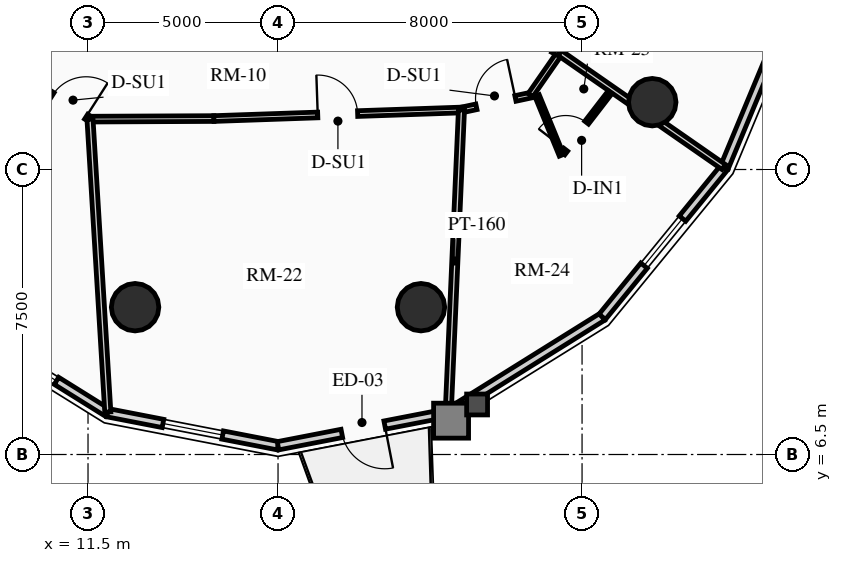
"""IFC4 building model, lengths in metres.
Left out: names, types, materials, properties, quantities, classifications, styles, units other than length and angle.
Written with IfcOpenShell. Run it as: python <this file> out.ifc"""

import sys

from ifc_helpers import new_model, si_unit, direction, frame, frame_2d, origin, origin_2d, place, context, subcontext, project, spatial, rectangle, circle, extrude, source, transform, mapped, element, fill, save


model = new_model("IFC4")
c1 = context("Model", 3, precision=1e-05, world=origin(), true_north=direction((0.0, 1.0)))
c2 = subcontext(c1, "Body", "Model", "MODEL_VIEW")
j1 = project(units=[si_unit("LENGTHUNIT", "METRE"), si_unit("PLANEANGLEUNIT", "RADIAN")], contexts=[c1])
p1 = place(None, origin())
s1 = spatial("IfcSite", under=j1, at=p1, CompositionType="ELEMENT")
p2 = place(p1, origin())
s2 = spatial("IfcBuilding", under=s1, at=p2, CompositionType="ELEMENT")
p3 = place(p2, frame((0.0, 0.0, 151.6)))
s3 = spatial("IfcBuildingStorey", under=s2, at=p3, CompositionType="ELEMENT", Elevation=151.6)
for number, where, z_axis, x_axis in (
    (1, (12.739, 10.377, 0.0), (0.0, 0.0, 1.0), (1.0, 0.0, 0.0)),
    (2, (20.261, 10.377, 0.0), (0.0, 0.0, 1.0), (1.0, 0.0, 0.0)),
    (3, (26.347, 15.771, 0.0), (0.0, 0.0, 1.0), (1.0, 0.0, 0.0)),
):
    element("IfcColumn", number, at=place(p3, frame(where, z_axis=z_axis, x_axis=x_axis)), inside=s3, PredefinedType="USERDEFINED", context=c2, shape_type="SweptSolid", body=[
        extrude(circle(Radius=0.625, at=origin_2d()), origin(), (0.0, 0.0, 1.0), 2.91),
    ])
p4 = place(p3, frame((12.015, 7.6, 0.0), z_axis=(0.0, 0.0, 1.0), x_axis=(-0.848452391194, 0.529271707044, 0.0)))
e4 = element("IfcWall", 4, at=p4, inside=s3, PredefinedType="SOLIDWALL", context=c2, shape_type="SweptSolid", body=[
    extrude(rectangle(XDim=4.769, YDim=0.22, at=frame_2d((2.385, 0.0))), origin(), (0.0, 0.0, 1.0), 2.245),
])
m1 = source(origin(), c2, "Body", "SweptSolid", [
    extrude(rectangle(XDim=1.6, YDim=1.3, at=frame_2d((0.8, 0.65))), frame((0.0, 0.12, 0.0), z_axis=(0.0, -1.0, 0.0), x_axis=(1.0, 0.0, 0.0)), (0.0, 0.0, 1.0), 0.24),
])
p5 = place(p4, frame((1.585, 0.0, 0.65)))
e5 = element("IfcOpeningElement", 5, at=p5, cuts=e4, PredefinedType="OPENING", context=c2, shape_type="MappedRepresentation", body=[
    mapped(m1, transform((0.0, 0.0, 0.0), x_axis=(1.0, 0.0, 0.0), y_axis=(0.0, 1.0, 0.0), z_axis=(0.0, 0.0, 1.0), scale=1.0)),
])
p6 = place(p3, frame((16.5, 6.73, 0.0), z_axis=(0.0, 0.0, 1.0), x_axis=(-0.981718699963, 0.190337579429, 0.0)))
e6 = element("IfcWall", 6, at=p6, inside=s3, PredefinedType="SOLIDWALL", context=c2, shape_type="SweptSolid", body=[
    extrude(rectangle(XDim=4.569, YDim=0.22, at=frame_2d((2.284, 0.0))), origin(), (0.0, 0.0, 1.0), 2.245),
])
p7 = place(p6, frame((1.484, 0.0, 0.65)))
e7 = element("IfcOpeningElement", 7, at=p7, cuts=e6, PredefinedType="OPENING", context=c2, shape_type="MappedRepresentation", body=[
    mapped(m1, transform((0.0, 0.0, 0.0), x_axis=(1.0, 0.0, 0.0), y_axis=(0.0, 1.0, 0.0), z_axis=(0.0, 0.0, 1.0), scale=1.0)),
])
p8 = place(p3, frame((20.985, 7.6, 0.0), z_axis=(0.0, 0.0, 1.0), x_axis=(-0.981718699963, -0.190337579429, 0.0)))
e8 = element("IfcWall", 8, at=p8, inside=s3, PredefinedType="SOLIDWALL", context=c2, shape_type="SweptSolid", body=[
    extrude(rectangle(XDim=4.569, YDim=0.22, at=frame_2d((2.284, 0.0))), origin(), (0.0, 0.0, 1.0), 2.245),
])
m2 = source(origin(), c2, "Body", "SweptSolid", [
    extrude(rectangle(XDim=1.15, YDim=2.005, at=frame_2d((0.575, 1.002))), frame((0.0, 0.12, 0.0), z_axis=(0.0, -1.0, 0.0), x_axis=(1.0, 0.0, 0.0)), (0.0, 0.0, 1.0), 0.24),
])
p9 = place(p8, frame((1.709, 0.0, 0.0)))
e9 = element("IfcOpeningElement", 9, at=p9, cuts=e8, PredefinedType="OPENING", context=c2, shape_type="MappedRepresentation", body=[
    mapped(m2, transform((0.0, 0.0, 0.0), x_axis=(1.0, 0.0, 0.0), y_axis=(0.0, 1.0, 0.0), z_axis=(0.0, 0.0, 1.0), scale=1.0)),
])
p10 = place(p3, frame((25.032, 10.124, 0.0), z_axis=(0.0, 0.0, 1.0), x_axis=(-0.848452391194, -0.529271707044, 0.0)))
e10 = element("IfcWall", 10, at=p10, inside=s3, PredefinedType="SOLIDWALL", context=c2, shape_type="SweptSolid", body=[
    extrude(rectangle(XDim=4.769, YDim=0.22, at=frame_2d((2.385, 0.0))), origin(), (0.0, 0.0, 1.0), 2.245),
])
p11 = place(p3, frame((28.243, 14.055, 0.0), z_axis=(0.0, 0.0, 1.0), x_axis=(-0.632598524901, -0.774479894053, 0.0)))
e11 = element("IfcWall", 11, at=p11, inside=s3, PredefinedType="SOLIDWALL", context=c2, shape_type="SweptSolid", body=[
    extrude(rectangle(XDim=5.076, YDim=0.22, at=frame_2d((2.538, 0.0))), origin(), (0.0, 0.0, 1.0), 2.245),
])
p12 = place(p11, frame((1.738, 0.0, 0.65)))
e12 = element("IfcOpeningElement", 12, at=p12, cuts=e11, PredefinedType="OPENING", context=c2, shape_type="MappedRepresentation", body=[
    mapped(m1, transform((0.0, 0.0, 0.0), x_axis=(1.0, 0.0, 0.0), y_axis=(0.0, 1.0, 0.0), z_axis=(0.0, 0.0, 1.0), scale=1.0)),
])
p13 = place(p3, frame((30.305, 19.009, 0.0), z_axis=(0.0, 0.0, 1.0), x_axis=(-0.384259959969, -0.923224936386, 0.0)))
e13 = element("IfcWall", 13, at=p13, inside=s3, PredefinedType="SOLIDWALL", context=c2, shape_type="SweptSolid", body=[
    extrude(rectangle(XDim=5.365, YDim=0.22, at=frame_2d((2.683, 0.0))), origin(), (0.0, 0.0, 1.0), 2.245),
])
p14 = place(p3, frame((10.237, 16.168, 0.0), z_axis=(0.0, 0.0, 1.0), x_axis=(0.842061223587, -0.53938195718, 0.0)))
e14 = element("IfcWall", 14, at=p14, inside=s3, PredefinedType="PARTITIONING", context=c2, shape_type="SweptSolid", body=[
    extrude(rectangle(XDim=1.562, YDim=0.15, at=frame_2d((0.781, 0.0))), origin(), (0.0, 0.0, 1.0), 2.245),
])
m3 = source(origin(), c2, "Body", "SweptSolid", [
    extrude(rectangle(XDim=1.05, YDim=2.015, at=frame_2d((0.525, 1.007))), frame((0.0, 0.085, 0.0), z_axis=(0.0, -1.0, 0.0), x_axis=(1.0, 0.0, 0.0)), (0.0, 0.0, 1.0), 0.17),
])
p15 = place(p14, frame((0.392, 0.0, 0.0)))
e15 = element("IfcOpeningElement", 15, at=p15, cuts=e14, PredefinedType="OPENING", context=c2, shape_type="MappedRepresentation", body=[
    mapped(m3, transform((0.0, 0.0, 0.0), x_axis=(1.0, 0.0, 0.0), y_axis=(0.0, 1.0, 0.0), z_axis=(0.0, 0.0, 1.0), scale=1.0)),
])
p16 = place(p3, frame((11.552, 15.326, 0.0), z_axis=(0.0, 0.0, 1.0), x_axis=(0.999989573465, 0.004566504266, 0.0)))
e16 = element("IfcWall", 16, at=p16, inside=s3, PredefinedType="PARTITIONING", context=c2, shape_type="SweptSolid", body=[
    extrude(rectangle(XDim=3.261, YDim=0.15, at=frame_2d((1.631, 0.0))), origin(), (0.0, 0.0, 1.0), 2.245),
])
p17 = place(p3, frame((14.813, 15.341, 0.0), z_axis=(0.0, 0.0, 1.0), x_axis=(0.999402077819, 0.034575813105, 0.0)))
e17 = element("IfcWall", 17, at=p17, inside=s3, PredefinedType="PARTITIONING", context=c2, shape_type="SweptSolid", body=[
    extrude(rectangle(XDim=6.517, YDim=0.15, at=frame_2d((3.259, 0.0))), origin(), (0.0, 0.0, 1.0), 2.245),
])
p18 = place(p17, frame((2.734, 0.0, 0.0)))
e18 = element("IfcOpeningElement", 18, at=p18, cuts=e17, PredefinedType="OPENING", context=c2, shape_type="MappedRepresentation", body=[
    mapped(m3, transform((0.0, 0.0, 0.0), x_axis=(1.0, 0.0, 0.0), y_axis=(0.0, 1.0, 0.0), z_axis=(0.0, 0.0, 1.0), scale=1.0)),
])
p19 = place(p3, frame((21.326, 15.566, 0.0), z_axis=(0.0, 0.0, 1.0), x_axis=(0.977908238308, 0.209034632176, 0.0)))
e19 = element("IfcWall", 19, at=p19, inside=s3, PredefinedType="PARTITIONING", context=c2, shape_type="SweptSolid", body=[
    extrude(rectangle(XDim=1.855, YDim=0.15, at=frame_2d((0.927, 0.0))), origin(), (0.0, 0.0, 1.0), 2.245),
])
p20 = place(p19, frame((0.402, 0.0, 0.0)))
e20 = element("IfcOpeningElement", 20, at=p20, cuts=e19, PredefinedType="OPENING", context=c2, shape_type="MappedRepresentation", body=[
    mapped(m3, transform((0.0, 0.0, 0.0), x_axis=(1.0, 0.0, 0.0), y_axis=(0.0, 1.0, 0.0), z_axis=(0.0, 0.0, 1.0), scale=1.0)),
])
p21 = place(p3, frame((23.14, 15.954, 0.0), z_axis=(0.0, 0.0, 1.0), x_axis=(0.570699895117, 0.821158711647, 0.0)))
e21 = element("IfcWall", 21, at=p21, inside=s3, PredefinedType="PARTITIONING", context=c2, shape_type="SweptSolid", body=[
    extrude(rectangle(XDim=1.354, YDim=0.15, at=frame_2d((0.677, 0.0))), origin(), (0.0, 0.0, 1.0), 2.245),
])
p22 = place(p3, frame((11.552, 15.326, 0.0), z_axis=(0.0, 0.0, 1.0), x_axis=(0.060740403573, -0.998153597085, 0.0)))
e22 = element("IfcWall", 22, at=p22, inside=s3, PredefinedType="PARTITIONING", context=c2, shape_type="SweptSolid", body=[
    extrude(rectangle(XDim=7.721, YDim=0.16, at=frame_2d((3.861, 0.0))), origin(), (0.0, 0.0, 1.0), 2.245),
])
p23 = place(p3, frame((21.326, 15.566, 0.0), z_axis=(0.0, 0.0, 1.0), x_axis=(-0.043642330618, -0.999047219594, 0.0)))
e23 = element("IfcWall", 23, at=p23, inside=s3, PredefinedType="PARTITIONING", context=c2, shape_type="SweptSolid", body=[
    extrude(rectangle(XDim=7.955, YDim=0.16, at=frame_2d((3.978, 0.0))), origin(), (0.0, 0.0, 1.0), 2.245),
])
p24 = place(p3, frame((23.913, 17.065, 0.0), z_axis=(0.0, 0.0, 1.0), x_axis=(0.821126775727, -0.570745843773, 0.0)))
e24 = element("IfcWall", 24, at=p24, inside=s3, PredefinedType="PARTITIONING", context=c2, shape_type="SweptSolid", body=[
    extrude(rectangle(XDim=5.254, YDim=0.16, at=frame_2d((2.627, 0.0))), origin(), (0.0, 0.0, 1.0), 2.245),
])
p25 = place(p3, frame((22.05, 18.0, 0.0), z_axis=(0.0, 0.0, 1.0), x_axis=(0.893817206679, -0.448431489799, 0.0)))
e25 = element("IfcWall", 25, at=p25, inside=s3, PredefinedType="PARTITIONING", context=c2, shape_type="SweptSolid", body=[
    extrude(rectangle(XDim=2.084, YDim=0.16, at=frame_2d((1.042, 0.0))), origin(), (0.0, 0.0, 1.0), 2.245),
])
m4 = source(origin(), c2, "Body", "SweptSolid", [
    extrude(rectangle(XDim=1.05, YDim=2.015, at=frame_2d((0.525, 1.007))), frame((0.0, 0.09, 0.0), z_axis=(0.0, -1.0, 0.0), x_axis=(1.0, 0.0, 0.0)), (0.0, 0.0, 1.0), 0.18),
])
p26 = place(p25, frame((0.834, 0.0, 0.0)))
e26 = element("IfcOpeningElement", 26, at=p26, cuts=e25, PredefinedType="OPENING", context=c2, shape_type="MappedRepresentation", body=[
    mapped(m4, transform((0.0, 0.0, 0.0), x_axis=(1.0, 0.0, 0.0), y_axis=(0.0, 1.0, 0.0), z_axis=(0.0, 0.0, 1.0), scale=1.0)),
])
p27 = place(p3, frame((23.315, 15.947, 0.0), z_axis=(0.0, 0.0, 1.0), x_axis=(0.37920929394, -0.925310926873, 0.0)))
e27 = element("IfcWall", 27, at=p27, inside=s3, PredefinedType="PARTITIONING", context=c2, shape_type="SweptSolid", body=[
    extrude(rectangle(XDim=1.698, YDim=0.125, at=frame_2d((0.849, 0.0))), origin(), (0.0, 0.0, 1.0), 2.675),
])
p28 = place(p3, frame((23.998, 14.425, 0.0), z_axis=(0.0, 0.0, 1.0), x_axis=(0.610534539262, 0.791989631478, 0.0)))
e28 = element("IfcWall", 28, at=p28, inside=s3, PredefinedType="PARTITIONING", context=c2, shape_type="SweptSolid", body=[
    extrude(rectangle(XDim=2.033, YDim=0.125, at=frame_2d((1.017, 0.0))), origin(), (0.0, 0.0, 1.0), 2.675),
])
m5 = source(origin(), c2, "Body", "SweptSolid", [
    extrude(rectangle(XDim=0.9, YDim=2.005, at=frame_2d((0.45, 1.002))), frame((0.0, 0.073, 0.0), z_axis=(0.0, -1.0, 0.0), x_axis=(1.0, 0.0, 0.0)), (0.0, 0.0, 1.0), 0.145),
])
p29 = place(p28, frame((0.12, 0.0, 0.0)))
e29 = element("IfcOpeningElement", 29, at=p29, cuts=e28, PredefinedType="OPENING", context=c2, shape_type="MappedRepresentation", body=[
    mapped(m5, transform((0.0, 0.0, 0.0), x_axis=(1.0, 0.0, 0.0), y_axis=(0.0, 1.0, 0.0), z_axis=(0.0, 0.0, 1.0), scale=1.0)),
])
m6 = source(origin(), c2, "Body", "SweptSolid", [
    extrude(rectangle(XDim=1.6, YDim=1.3, at=frame_2d((0.8, 0.65))), frame((0.0, 0.03, 0.0), z_axis=(0.0, -1.0, 0.0), x_axis=(1.0, 0.0, 0.0)), (0.0, 0.0, 1.0), 0.06),
])
p30 = place(p5, origin())
e30 = element("IfcWindow", 30, at=p30, inside=s3, PartitioningType="SINGLE_PANEL", PredefinedType="WINDOW", context=c2, shape_type="MappedRepresentation", body=[
    mapped(m6, transform((0.0, 0.0, 0.0), x_axis=(1.0, 0.0, 0.0), y_axis=(0.0, 1.0, 0.0), z_axis=(0.0, 0.0, 1.0), scale=1.0)),
])
fill(e5, e30)
p31 = place(p7, origin())
e31 = element("IfcWindow", 31, at=p31, inside=s3, PartitioningType="SINGLE_PANEL", PredefinedType="WINDOW", context=c2, shape_type="MappedRepresentation", body=[
    mapped(m6, transform((0.0, 0.0, 0.0), x_axis=(1.0, 0.0, 0.0), y_axis=(0.0, 1.0, 0.0), z_axis=(0.0, 0.0, 1.0), scale=1.0)),
])
fill(e7, e31)
m7 = source(origin(), c2, "Body", "SweptSolid", [
    extrude(rectangle(XDim=1.15, YDim=2.005, at=frame_2d((0.575, 1.002))), frame((0.0, 0.025, 0.0), z_axis=(0.0, -1.0, 0.0), x_axis=(1.0, 0.0, 0.0)), (0.0, 0.0, 1.0), 0.05),
])
p32 = place(p9, origin())
e32 = element("IfcDoor", 32, at=p32, inside=s3, OperationType="SINGLE_SWING_LEFT", PredefinedType="DOOR", context=c2, shape_type="MappedRepresentation", body=[
    mapped(m7, transform((0.0, 0.0, 0.0), x_axis=(1.0, 0.0, 0.0), y_axis=(0.0, 1.0, 0.0), z_axis=(0.0, 0.0, 1.0), scale=1.0)),
])
fill(e9, e32)
p33 = place(p12, origin())
e33 = element("IfcWindow", 33, at=p33, inside=s3, PartitioningType="SINGLE_PANEL", PredefinedType="WINDOW", context=c2, shape_type="MappedRepresentation", body=[
    mapped(m6, transform((0.0, 0.0, 0.0), x_axis=(1.0, 0.0, 0.0), y_axis=(0.0, 1.0, 0.0), z_axis=(0.0, 0.0, 1.0), scale=1.0)),
])
fill(e12, e33)
m8 = source(origin(), c2, "Body", "SweptSolid", [
    extrude(rectangle(XDim=1.05, YDim=2.015, at=frame_2d((0.525, 1.007))), frame((0.0, 0.025, 0.0), z_axis=(0.0, -1.0, 0.0), x_axis=(1.0, 0.0, 0.0)), (0.0, 0.0, 1.0), 0.05),
])
p34 = place(p15, origin())
e34 = element("IfcDoor", 34, at=p34, inside=s3, OperationType="SINGLE_SWING_RIGHT", PredefinedType="DOOR", context=c2, shape_type="MappedRepresentation", body=[
    mapped(m8, transform((0.0, 0.0, 0.0), x_axis=(1.0, 0.0, 0.0), y_axis=(0.0, 1.0, 0.0), z_axis=(0.0, 0.0, 1.0), scale=1.0)),
])
fill(e15, e34)
p35 = place(p18, origin())
e35 = element("IfcDoor", 35, at=p35, inside=s3, OperationType="SINGLE_SWING_LEFT", PredefinedType="DOOR", context=c2, shape_type="MappedRepresentation", body=[
    mapped(m8, transform((0.0, 0.0, 0.0), x_axis=(1.0, 0.0, 0.0), y_axis=(0.0, 1.0, 0.0), z_axis=(0.0, 0.0, 1.0), scale=1.0)),
])
fill(e18, e35)
p36 = place(p20, origin())
e36 = element("IfcDoor", 36, at=p36, inside=s3, OperationType="SINGLE_SWING_RIGHT", PredefinedType="DOOR", context=c2, shape_type="MappedRepresentation", body=[
    mapped(m8, transform((0.0, 0.0, 0.0), x_axis=(1.0, 0.0, 0.0), y_axis=(0.0, 1.0, 0.0), z_axis=(0.0, 0.0, 1.0), scale=1.0)),
])
fill(e20, e36)
m9 = source(origin(), c2, "Body", "SweptSolid", [
    extrude(rectangle(XDim=0.9, YDim=2.005, at=frame_2d((0.45, 1.002))), frame((0.0, 0.025, 0.0), z_axis=(0.0, -1.0, 0.0), x_axis=(1.0, 0.0, 0.0)), (0.0, 0.0, 1.0), 0.05),
])
p37 = place(p29, origin())
e37 = element("IfcDoor", 37, at=p37, inside=s3, OperationType="SINGLE_SWING_LEFT", PredefinedType="DOOR", context=c2, shape_type="MappedRepresentation", body=[
    mapped(m9, transform((0.0, 0.0, 0.0), x_axis=(1.0, 0.0, 0.0), y_axis=(0.0, 1.0, 0.0), z_axis=(0.0, 0.0, 1.0), scale=1.0)),
])
fill(e29, e37)
save(model, sys.argv[1])
